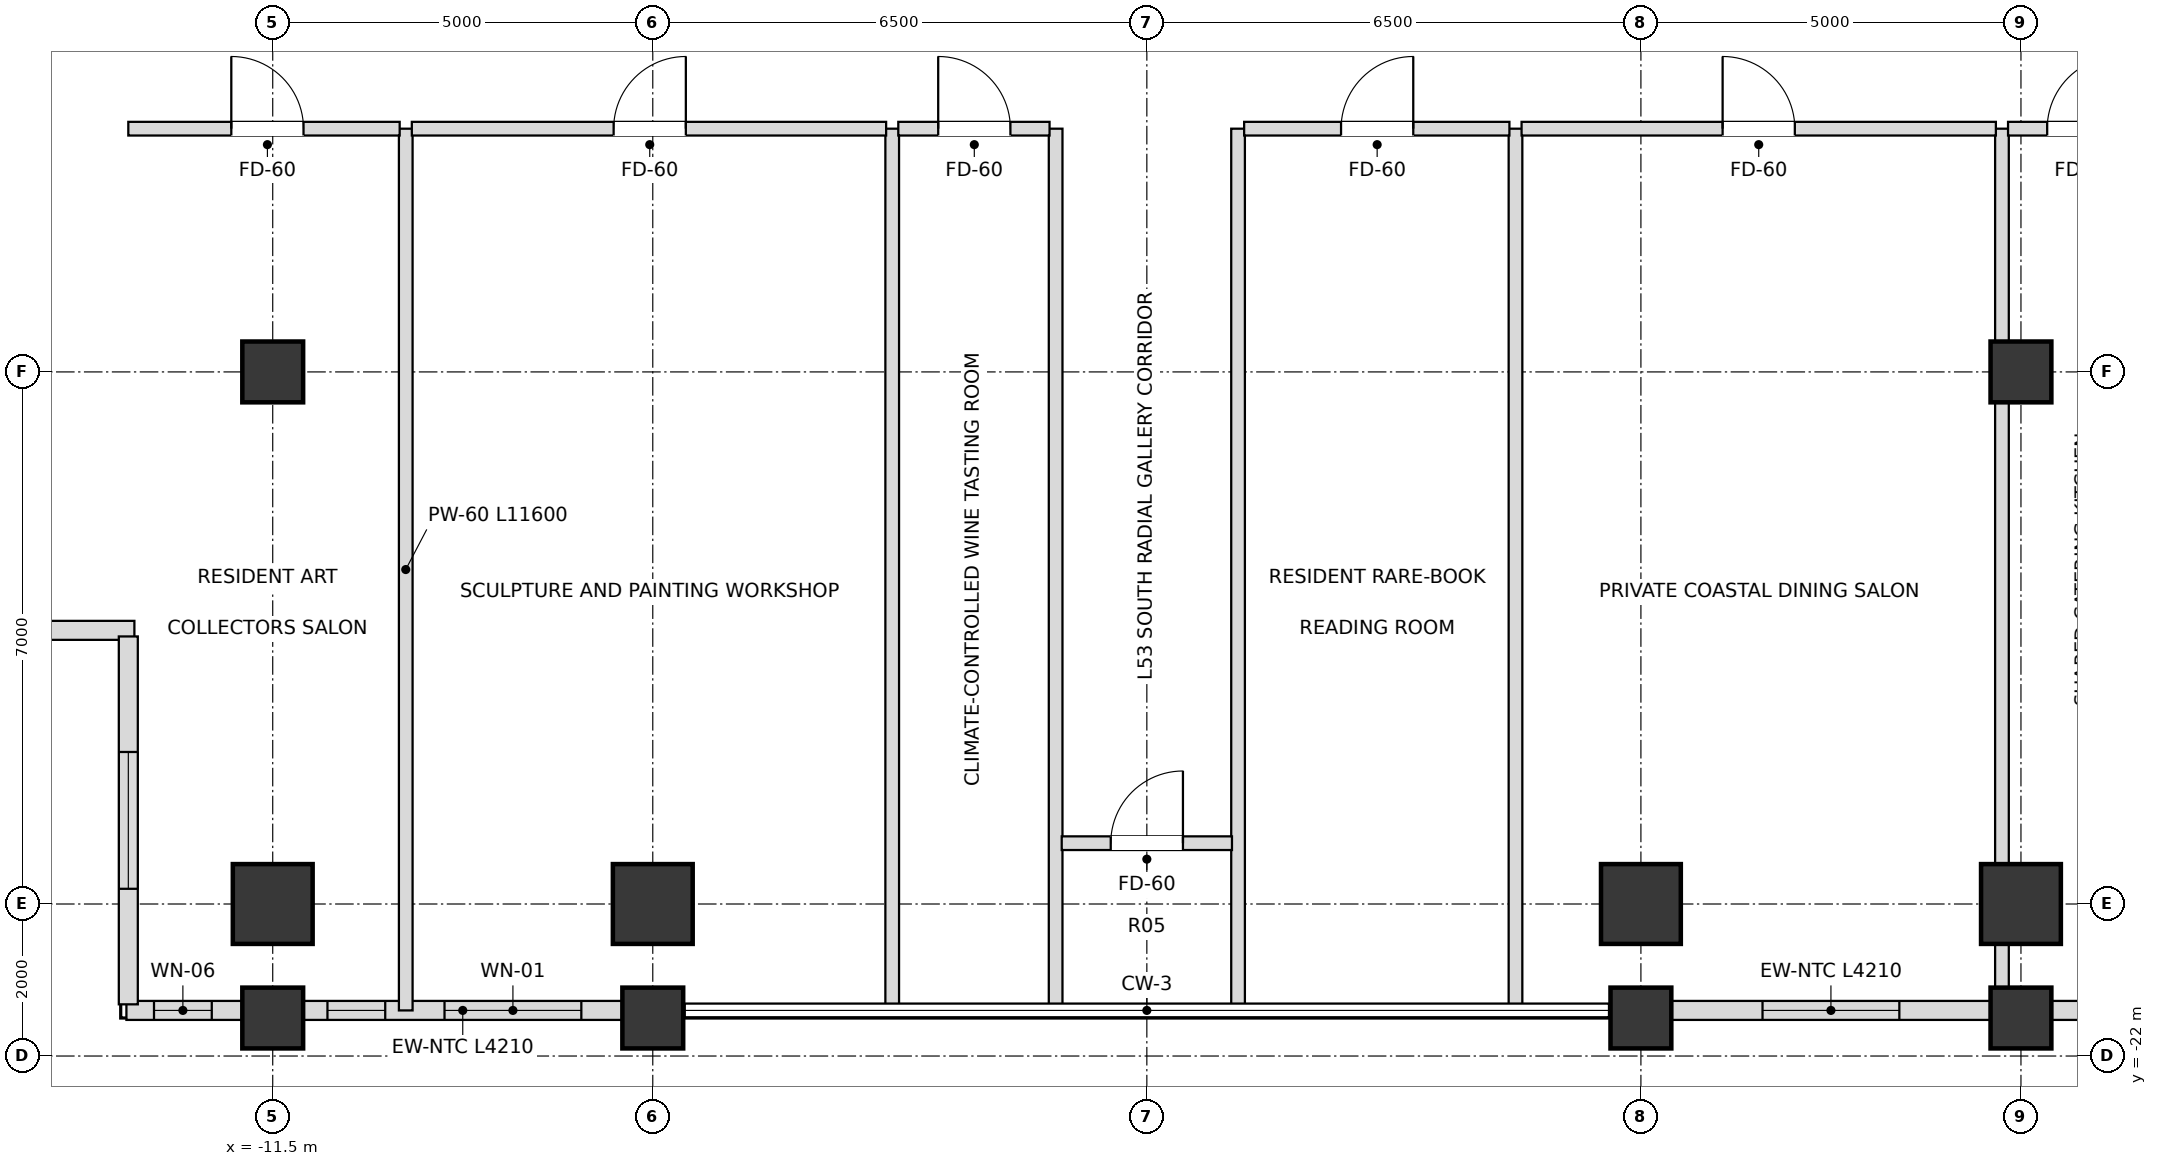
"""IFC4 building model, lengths in metres.
Left out: names, types, materials, properties, quantities, classifications, styles, units other than length and angle.
Written with IfcOpenShell. Run it as: python <this file> out.ifc"""

import sys

from ifc_helpers import new_model, si_unit, direction, frame, frame_2d, origin, origin_2d, place, context, subcontext, project, spatial, rectangle, extrude, element, fill, save


model = new_model("IFC4")
c1 = context("Model", 3, precision=1e-05, world=origin(), true_north=direction((0.0, 1.0)))
c2 = subcontext(c1, "Body", "Model", "MODEL_VIEW")
j1 = project(units=[si_unit("LENGTHUNIT", "METRE"), si_unit("PLANEANGLEUNIT", "RADIAN")], contexts=[c1])
p1 = place(None, origin())
s1 = spatial("IfcSite", under=j1, at=p1, CompositionType="ELEMENT")
p2 = place(p1, origin())
s2 = spatial("IfcBuilding", under=s1, at=p2, CompositionType="ELEMENT")
p3 = place(p2, frame((0.0, 0.0, 205.2)))
s3 = spatial("IfcBuildingStorey", under=s2, at=p3, CompositionType="ELEMENT", Elevation=205.2)
for number, where, z_axis, x_axis in (
    (1, (-11.5, -20.0, 0.0), (0.0, 0.0, 1.0), (1.0, 0.0, 0.0)),
    (2, (-6.5, -20.0, 0.0), (0.0, 0.0, 1.0), (1.0, 0.0, 0.0)),
    (3, (6.5, -20.0, 0.0), (0.0, 0.0, 1.0), (1.0, 0.0, 0.0)),
    (4, (11.5, -20.0, 0.0), (0.0, 0.0, 1.0), (1.0, 0.0, 0.0)),
):
    element("IfcColumn", number, at=place(p3, frame(where, z_axis=z_axis, x_axis=x_axis)), inside=s3, PredefinedType="USERDEFINED", context=c2, shape_type="SweptSolid", body=[
        extrude(rectangle(XDim=1.05, YDim=1.05, at=origin_2d()), origin(), (0.0, 0.0, 1.0), 3.6),
    ])
for number, where, z_axis, x_axis in (
    (5, (-11.5, -13.0, 0.0), (0.0, 0.0, 1.0), (1.0, 0.0, 0.0)),
    (6, (11.5, -13.0, 0.0), (0.0, 0.0, 1.0), (1.0, 0.0, 0.0)),
    (7, (-11.5, -21.5, 0.0), (0.0, 0.0, 1.0), (1.0, 0.0, 0.0)),
    (8, (-6.5, -21.5, 0.0), (0.0, 0.0, 1.0), (1.0, 0.0, 0.0)),
    (9, (6.5, -21.5, 0.0), (0.0, 0.0, 1.0), (1.0, 0.0, 0.0)),
    (10, (11.5, -21.5, 0.0), (0.0, 0.0, 1.0), (1.0, 0.0, 0.0)),
):
    element("IfcColumn", number, at=place(p3, frame(where, z_axis=z_axis, x_axis=x_axis)), inside=s3, PredefinedType="COLUMN", context=c2, shape_type="SweptSolid", body=[
        extrude(rectangle(XDim=0.8, YDim=0.8, at=origin_2d()), origin(), (0.0, 0.0, 1.0), 3.6),
    ])
p4 = place(p3, frame((-13.425, -21.4, 0.0), z_axis=(0.0, 0.0, 1.0), x_axis=(1.0, 0.0, 0.0)))
e11 = element("IfcWall", 11, at=p4, inside=s3, PredefinedType="SOLIDWALL", context=c2, shape_type="SweptSolid", body=[
    extrude(rectangle(XDim=1.53, YDim=0.25, at=frame_2d((0.765, 0.0))), origin(), (0.0, 0.0, 1.0), 2.748),
])
p5 = place(p4, frame((0.363, 0.0, 0.72)))
e12 = element("IfcOpeningElement", 12, at=p5, cuts=e11, PredefinedType="OPENING", context=c2, shape_type="SweptSolid", body=[
    extrude(rectangle(XDim=0.76, YDim=1.68, at=frame_2d((0.38, 0.84))), frame((0.0, 0.135, 0.0), z_axis=(0.0, -1.0, 0.0), x_axis=(1.0, 0.0, 0.0)), (0.0, 0.0, 1.0), 0.27),
])
p6 = place(p3, frame((-11.105, -21.4, 0.0), z_axis=(0.0, 0.0, 1.0), x_axis=(1.0, 0.0, 0.0)))
e13 = element("IfcWall", 13, at=p6, inside=s3, PredefinedType="SOLIDWALL", context=c2, shape_type="SweptSolid", body=[
    extrude(rectangle(XDim=4.21, YDim=0.25, at=frame_2d((2.105, 0.0))), origin(), (0.0, 0.0, 1.0), 2.748),
])
p7 = place(p6, frame((0.325, 0.0, 0.72)))
e14 = element("IfcOpeningElement", 14, at=p7, cuts=e13, PredefinedType="OPENING", context=c2, shape_type="SweptSolid", body=[
    extrude(rectangle(XDim=0.76, YDim=1.68, at=frame_2d((0.38, 0.84))), frame((0.0, 0.135, 0.0), z_axis=(0.0, -1.0, 0.0), x_axis=(1.0, 0.0, 0.0)), (0.0, 0.0, 1.0), 0.27),
])
p8 = place(p6, frame((1.865, 0.0, 0.72)))
e15 = element("IfcOpeningElement", 15, at=p8, cuts=e13, PredefinedType="OPENING", context=c2, shape_type="SweptSolid", body=[
    extrude(rectangle(XDim=1.8, YDim=1.68, at=frame_2d((0.9, 0.84))), frame((0.0, 0.135, 0.0), z_axis=(0.0, -1.0, 0.0), x_axis=(1.0, 0.0, 0.0)), (0.0, 0.0, 1.0), 0.27),
])
p9 = place(p3, frame((6.895, -21.4, 0.0), z_axis=(0.0, 0.0, 1.0), x_axis=(1.0, 0.0, 0.0)))
e16 = element("IfcWall", 16, at=p9, inside=s3, PredefinedType="SOLIDWALL", context=c2, shape_type="SweptSolid", body=[
    extrude(rectangle(XDim=4.21, YDim=0.25, at=frame_2d((2.105, 0.0))), origin(), (0.0, 0.0, 1.0), 2.748),
])
p10 = place(p9, frame((1.205, 0.0, 0.72)))
e17 = element("IfcOpeningElement", 17, at=p10, cuts=e16, PredefinedType="OPENING", context=c2, shape_type="SweptSolid", body=[
    extrude(rectangle(XDim=1.8, YDim=1.68, at=frame_2d((0.9, 0.84))), frame((0.0, 0.135, 0.0), z_axis=(0.0, -1.0, 0.0), x_axis=(1.0, 0.0, 0.0)), (0.0, 0.0, 1.0), 0.27),
])
p11 = place(p3, frame((11.895, -21.4, 0.0), z_axis=(0.0, 0.0, 1.0), x_axis=(1.0, 0.0, 0.0)))
e18 = element("IfcWall", 18, at=p11, inside=s3, PredefinedType="SOLIDWALL", context=c2, shape_type="SweptSolid", body=[
    extrude(rectangle(XDim=1.53, YDim=0.25, at=frame_2d((0.765, 0.0))), origin(), (0.0, 0.0, 1.0), 2.748),
])
p12 = place(p11, frame((0.408, 0.0, 0.72)))
e19 = element("IfcOpeningElement", 19, at=p12, cuts=e18, PredefinedType="OPENING", context=c2, shape_type="SweptSolid", body=[
    extrude(rectangle(XDim=0.76, YDim=1.68, at=frame_2d((0.38, 0.84))), frame((0.0, 0.135, 0.0), z_axis=(0.0, -1.0, 0.0), x_axis=(1.0, 0.0, 0.0)), (0.0, 0.0, 1.0), 0.27),
])
p13 = place(p3, frame((-18.48, -16.4, 0.0), z_axis=(0.0, 0.0, 1.0), x_axis=(1.0, 0.0, 0.0)))
e20 = element("IfcWall", 20, at=p13, inside=s3, PredefinedType="SOLIDWALL", context=c2, shape_type="SweptSolid", body=[
    extrude(rectangle(XDim=5.16, YDim=0.25, at=frame_2d((2.58, 0.0))), origin(), (0.0, 0.0, 1.0), 2.748),
])
p14 = place(p13, frame((1.68, 0.0, 0.72)))
e21 = element("IfcOpeningElement", 21, at=p14, cuts=e20, PredefinedType="OPENING", context=c2, shape_type="SweptSolid", body=[
    extrude(rectangle(XDim=1.8, YDim=1.68, at=frame_2d((0.9, 0.84))), frame((0.0, 0.135, 0.0), z_axis=(0.0, -1.0, 0.0), x_axis=(1.0, 0.0, 0.0)), (0.0, 0.0, 1.0), 0.27),
])
p15 = place(p3, frame((-13.4, -16.48, 0.0), z_axis=(0.0, 0.0, 1.0), x_axis=(0.0, -1.0, 0.0)))
e22 = element("IfcWall", 22, at=p15, inside=s3, PredefinedType="SOLIDWALL", context=c2, shape_type="SweptSolid", body=[
    extrude(rectangle(XDim=4.84, YDim=0.25, at=frame_2d((2.42, 0.0))), origin(), (0.0, 0.0, 1.0), 2.748),
])
p16 = place(p15, frame((1.52, 0.0, 0.72)))
e23 = element("IfcOpeningElement", 23, at=p16, cuts=e22, PredefinedType="OPENING", context=c2, shape_type="SweptSolid", body=[
    extrude(rectangle(XDim=1.8, YDim=1.68, at=frame_2d((0.9, 0.84))), frame((0.0, 0.135, 0.0), z_axis=(0.0, -1.0, 0.0), x_axis=(1.0, 0.0, 0.0)), (0.0, 0.0, 1.0), 0.27),
])
for number, where, z_axis, x_axis in (
    (24, (-9.75, -21.4, 0.0), (0.0, 0.0, 1.0), (0.0, 1.0, 0.0)),
    (25, (-3.35, -21.4, 0.0), (0.0, 0.0, 1.0), (0.0, 1.0, 0.0)),
    (26, (-1.2, -21.4, 0.0), (0.0, 0.0, 1.0), (0.0, 1.0, 0.0)),
    (27, (1.2, -21.4, 0.0), (0.0, 0.0, 1.0), (0.0, 1.0, 0.0)),
    (28, (4.85, -21.4, 0.0), (0.0, 0.0, 1.0), (0.0, 1.0, 0.0)),
    (29, (11.25, -21.4, 0.0), (0.0, 0.0, 1.0), (0.0, 1.0, 0.0)),
):
    element("IfcWall", number, at=place(p3, frame(where, z_axis=z_axis, x_axis=x_axis)), inside=s3, PredefinedType="PARTITIONING", context=c2, shape_type="SweptSolid", body=[
        extrude(rectangle(XDim=11.6, YDim=0.18, at=frame_2d((5.8, 0.0))), origin(), (0.0, 0.0, 1.0), 2.826),
    ])
p17 = place(p3, frame((-1.12, -19.2, 0.0), z_axis=(0.0, 0.0, 1.0), x_axis=(1.0, 0.0, 0.0)))
e30 = element("IfcWall", 30, at=p17, inside=s3, PredefinedType="PARTITIONING", context=c2, shape_type="SweptSolid", body=[
    extrude(rectangle(XDim=2.24, YDim=0.18, at=frame_2d((1.12, 0.0))), origin(), (0.0, 0.0, 1.0), 3.38),
])
p18 = place(p17, frame((0.645, 0.0, 0.0)))
e31 = element("IfcOpeningElement", 31, at=p18, cuts=e30, PredefinedType="OPENING", context=c2, shape_type="SweptSolid", body=[
    extrude(rectangle(XDim=0.95, YDim=2.15, at=frame_2d((0.475, 1.075))), frame((0.0, 0.1, 0.0), z_axis=(0.0, -1.0, 0.0), x_axis=(1.0, 0.0, 0.0)), (0.0, 0.0, 1.0), 0.2),
])
p19 = place(p3, frame((-13.4, -9.8, 0.0), z_axis=(0.0, 0.0, 1.0), x_axis=(1.0, 0.0, 0.0)))
e32 = element("IfcWall", 32, at=p19, inside=s3, PredefinedType="PARTITIONING", context=c2, shape_type="SweptSolid", body=[
    extrude(rectangle(XDim=3.57, YDim=0.18, at=frame_2d((1.785, 0.0))), origin(), (0.0, 0.0, 1.0), 3.38),
])
p20 = place(p19, frame((1.355, 0.0, 0.0)))
e33 = element("IfcOpeningElement", 33, at=p20, cuts=e32, PredefinedType="OPENING", context=c2, shape_type="SweptSolid", body=[
    extrude(rectangle(XDim=0.95, YDim=2.15, at=frame_2d((0.475, 1.075))), frame((0.0, 0.1, 0.0), z_axis=(0.0, -1.0, 0.0), x_axis=(1.0, 0.0, 0.0)), (0.0, 0.0, 1.0), 0.2),
])
p21 = place(p3, frame((-9.67, -9.8, 0.0), z_axis=(0.0, 0.0, 1.0), x_axis=(1.0, 0.0, 0.0)))
e34 = element("IfcWall", 34, at=p21, inside=s3, PredefinedType="PARTITIONING", context=c2, shape_type="SweptSolid", body=[
    extrude(rectangle(XDim=6.24, YDim=0.18, at=frame_2d((3.12, 0.0))), origin(), (0.0, 0.0, 1.0), 2.826),
])
p22 = place(p21, frame((2.655, 0.0, 0.0)))
e35 = element("IfcOpeningElement", 35, at=p22, cuts=e34, PredefinedType="OPENING", context=c2, shape_type="SweptSolid", body=[
    extrude(rectangle(XDim=0.95, YDim=2.15, at=frame_2d((0.475, 1.075))), frame((0.0, 0.1, 0.0), z_axis=(0.0, -1.0, 0.0), x_axis=(1.0, 0.0, 0.0)), (0.0, 0.0, 1.0), 0.2),
])
p23 = place(p3, frame((-3.27, -9.8, 0.0), z_axis=(0.0, 0.0, 1.0), x_axis=(1.0, 0.0, 0.0)))
e36 = element("IfcWall", 36, at=p23, inside=s3, PredefinedType="PARTITIONING", context=c2, shape_type="SweptSolid", body=[
    extrude(rectangle(XDim=1.99, YDim=0.18, at=frame_2d((0.995, 0.0))), origin(), (0.0, 0.0, 1.0), 3.38),
])
p24 = place(p23, frame((0.525, 0.0, 0.0)))
e37 = element("IfcOpeningElement", 37, at=p24, cuts=e36, PredefinedType="OPENING", context=c2, shape_type="SweptSolid", body=[
    extrude(rectangle(XDim=0.95, YDim=2.15, at=frame_2d((0.475, 1.075))), frame((0.0, 0.1, 0.0), z_axis=(0.0, -1.0, 0.0), x_axis=(1.0, 0.0, 0.0)), (0.0, 0.0, 1.0), 0.2),
])
p25 = place(p3, frame((1.28, -9.8, 0.0), z_axis=(0.0, 0.0, 1.0), x_axis=(1.0, 0.0, 0.0)))
e38 = element("IfcWall", 38, at=p25, inside=s3, PredefinedType="PARTITIONING", context=c2, shape_type="SweptSolid", body=[
    extrude(rectangle(XDim=3.49, YDim=0.18, at=frame_2d((1.745, 0.0))), origin(), (0.0, 0.0, 1.0), 3.38),
])
p26 = place(p25, frame((1.275, 0.0, 0.0)))
e39 = element("IfcOpeningElement", 39, at=p26, cuts=e38, PredefinedType="OPENING", context=c2, shape_type="SweptSolid", body=[
    extrude(rectangle(XDim=0.95, YDim=2.15, at=frame_2d((0.475, 1.075))), frame((0.0, 0.1, 0.0), z_axis=(0.0, -1.0, 0.0), x_axis=(1.0, 0.0, 0.0)), (0.0, 0.0, 1.0), 0.2),
])
p27 = place(p3, frame((4.93, -9.8, 0.0), z_axis=(0.0, 0.0, 1.0), x_axis=(1.0, 0.0, 0.0)))
e40 = element("IfcWall", 40, at=p27, inside=s3, PredefinedType="PARTITIONING", context=c2, shape_type="SweptSolid", body=[
    extrude(rectangle(XDim=6.24, YDim=0.18, at=frame_2d((3.12, 0.0))), origin(), (0.0, 0.0, 1.0), 2.826),
])
p28 = place(p27, frame((2.645, 0.0, 0.0)))
e41 = element("IfcOpeningElement", 41, at=p28, cuts=e40, PredefinedType="OPENING", context=c2, shape_type="SweptSolid", body=[
    extrude(rectangle(XDim=0.95, YDim=2.15, at=frame_2d((0.475, 1.075))), frame((0.0, 0.1, 0.0), z_axis=(0.0, -1.0, 0.0), x_axis=(1.0, 0.0, 0.0)), (0.0, 0.0, 1.0), 0.2),
])
p29 = place(p3, frame((11.33, -9.8, 0.0), z_axis=(0.0, 0.0, 1.0), x_axis=(1.0, 0.0, 0.0)))
e42 = element("IfcWall", 42, at=p29, inside=s3, PredefinedType="PARTITIONING", context=c2, shape_type="SweptSolid", body=[
    extrude(rectangle(XDim=2.07, YDim=0.18, at=frame_2d((1.035, 0.0))), origin(), (0.0, 0.0, 1.0), 3.38),
])
p30 = place(p29, frame((0.515, 0.0, 0.0)))
e43 = element("IfcOpeningElement", 43, at=p30, cuts=e42, PredefinedType="OPENING", context=c2, shape_type="SweptSolid", body=[
    extrude(rectangle(XDim=0.95, YDim=2.15, at=frame_2d((0.475, 1.075))), frame((0.0, 0.1, 0.0), z_axis=(0.0, -1.0, 0.0), x_axis=(1.0, 0.0, 0.0)), (0.0, 0.0, 1.0), 0.2),
])
p31 = place(p5, origin())
e44 = element("IfcWindow", 44, at=p31, inside=s3, PartitioningType="SINGLE_PANEL", PredefinedType="WINDOW", context=c2, shape_type="SweptSolid", body=[
    extrude(rectangle(XDim=0.76, YDim=1.68, at=frame_2d((0.38, 0.84))), frame((0.0, 0.03, 0.0), z_axis=(0.0, -1.0, 0.0), x_axis=(1.0, 0.0, 0.0)), (0.0, 0.0, 1.0), 0.06),
])
fill(e12, e44)
p32 = place(p7, origin())
e45 = element("IfcWindow", 45, at=p32, inside=s3, PartitioningType="SINGLE_PANEL", PredefinedType="WINDOW", context=c2, shape_type="SweptSolid", body=[
    extrude(rectangle(XDim=0.76, YDim=1.68, at=frame_2d((0.38, 0.84))), frame((0.0, 0.03, 0.0), z_axis=(0.0, -1.0, 0.0), x_axis=(1.0, 0.0, 0.0)), (0.0, 0.0, 1.0), 0.06),
])
fill(e14, e45)
p33 = place(p8, origin())
e46 = element("IfcWindow", 46, at=p33, inside=s3, PartitioningType="SINGLE_PANEL", PredefinedType="WINDOW", context=c2, shape_type="SweptSolid", body=[
    extrude(rectangle(XDim=1.8, YDim=1.68, at=frame_2d((0.9, 0.84))), frame((0.0, 0.03, 0.0), z_axis=(0.0, -1.0, 0.0), x_axis=(1.0, 0.0, 0.0)), (0.0, 0.0, 1.0), 0.06),
])
fill(e15, e46)
p34 = place(p10, origin())
e47 = element("IfcWindow", 47, at=p34, inside=s3, PartitioningType="SINGLE_PANEL", PredefinedType="WINDOW", context=c2, shape_type="SweptSolid", body=[
    extrude(rectangle(XDim=1.8, YDim=1.68, at=frame_2d((0.9, 0.84))), frame((0.0, 0.03, 0.0), z_axis=(0.0, -1.0, 0.0), x_axis=(1.0, 0.0, 0.0)), (0.0, 0.0, 1.0), 0.06),
])
fill(e17, e47)
p35 = place(p16, origin())
e48 = element("IfcWindow", 48, at=p35, inside=s3, PartitioningType="SINGLE_PANEL", PredefinedType="WINDOW", context=c2, shape_type="SweptSolid", body=[
    extrude(rectangle(XDim=1.8, YDim=1.68, at=frame_2d((0.9, 0.84))), frame((0.0, 0.03, 0.0), z_axis=(0.0, -1.0, 0.0), x_axis=(1.0, 0.0, 0.0)), (0.0, 0.0, 1.0), 0.06),
])
fill(e23, e48)
p36 = place(p18, origin())
e49 = element("IfcDoor", 49, at=p36, inside=s3, OperationType="SINGLE_SWING_RIGHT", PredefinedType="DOOR", context=c2, shape_type="SweptSolid", body=[
    extrude(rectangle(XDim=0.95, YDim=2.15, at=frame_2d((0.475, 1.075))), frame((0.0, 0.025, 0.0), z_axis=(0.0, -1.0, 0.0), x_axis=(1.0, 0.0, 0.0)), (0.0, 0.0, 1.0), 0.05),
])
fill(e31, e49)
p37 = place(p20, origin())
e50 = element("IfcDoor", 50, at=p37, inside=s3, OperationType="SINGLE_SWING_LEFT", PredefinedType="DOOR", context=c2, shape_type="SweptSolid", body=[
    extrude(rectangle(XDim=0.95, YDim=2.15, at=frame_2d((0.475, 1.075))), frame((0.0, 0.025, 0.0), z_axis=(0.0, -1.0, 0.0), x_axis=(1.0, 0.0, 0.0)), (0.0, 0.0, 1.0), 0.05),
])
fill(e33, e50)
p38 = place(p22, origin())
e51 = element("IfcDoor", 51, at=p38, inside=s3, OperationType="SINGLE_SWING_RIGHT", PredefinedType="DOOR", context=c2, shape_type="SweptSolid", body=[
    extrude(rectangle(XDim=0.95, YDim=2.15, at=frame_2d((0.475, 1.075))), frame((0.0, 0.025, 0.0), z_axis=(0.0, -1.0, 0.0), x_axis=(1.0, 0.0, 0.0)), (0.0, 0.0, 1.0), 0.05),
])
fill(e35, e51)
p39 = place(p24, origin())
e52 = element("IfcDoor", 52, at=p39, inside=s3, OperationType="SINGLE_SWING_LEFT", PredefinedType="DOOR", context=c2, shape_type="SweptSolid", body=[
    extrude(rectangle(XDim=0.95, YDim=2.15, at=frame_2d((0.475, 1.075))), frame((0.0, 0.025, 0.0), z_axis=(0.0, -1.0, 0.0), x_axis=(1.0, 0.0, 0.0)), (0.0, 0.0, 1.0), 0.05),
])
fill(e37, e52)
p40 = place(p26, origin())
e53 = element("IfcDoor", 53, at=p40, inside=s3, OperationType="SINGLE_SWING_RIGHT", PredefinedType="DOOR", context=c2, shape_type="SweptSolid", body=[
    extrude(rectangle(XDim=0.95, YDim=2.15, at=frame_2d((0.475, 1.075))), frame((0.0, 0.025, 0.0), z_axis=(0.0, -1.0, 0.0), x_axis=(1.0, 0.0, 0.0)), (0.0, 0.0, 1.0), 0.05),
])
fill(e39, e53)
p41 = place(p28, origin())
e54 = element("IfcDoor", 54, at=p41, inside=s3, OperationType="SINGLE_SWING_LEFT", PredefinedType="DOOR", context=c2, shape_type="SweptSolid", body=[
    extrude(rectangle(XDim=0.95, YDim=2.15, at=frame_2d((0.475, 1.075))), frame((0.0, 0.025, 0.0), z_axis=(0.0, -1.0, 0.0), x_axis=(1.0, 0.0, 0.0)), (0.0, 0.0, 1.0), 0.05),
])
fill(e41, e54)
p42 = place(p30, origin())
e55 = element("IfcDoor", 55, at=p42, inside=s3, OperationType="SINGLE_SWING_RIGHT", PredefinedType="DOOR", context=c2, shape_type="SweptSolid", body=[
    extrude(rectangle(XDim=0.95, YDim=2.15, at=frame_2d((0.475, 1.075))), frame((0.0, 0.025, 0.0), z_axis=(0.0, -1.0, 0.0), x_axis=(1.0, 0.0, 0.0)), (0.0, 0.0, 1.0), 0.05),
])
fill(e43, e55)
save(model, sys.argv[1])
